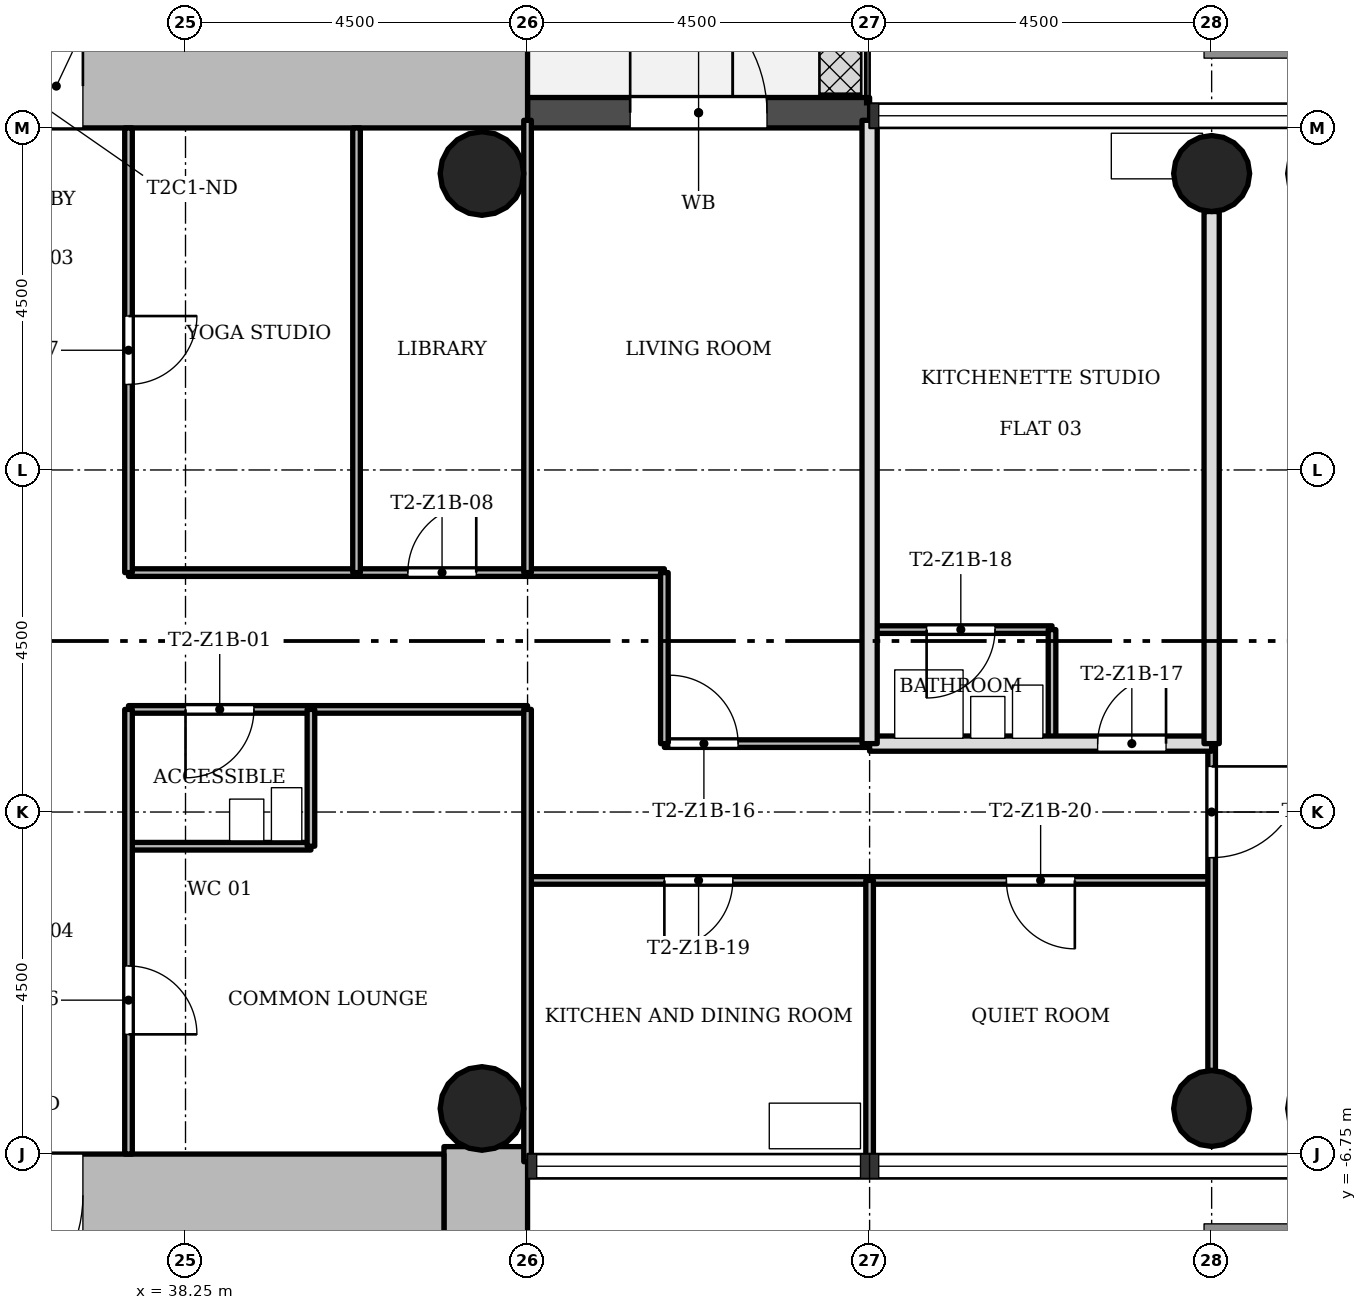
"""IFC4 building model, lengths in metres.
Left out: names, types, materials, properties, quantities, classifications, styles, units other than length and angle.
Written with IfcOpenShell. Run it as: python <this file> out.ifc"""

import sys

from ifc_helpers import new_model, si_unit, direction, frame, frame_2d, origin, origin_2d, place, context, subcontext, project, spatial, rectangle, hollow_circle, extrude, element, fill, save


model = new_model("IFC4")
c1 = context("Model", 3, precision=1e-05, world=origin(), true_north=direction((0.0, 1.0)))
c2 = subcontext(c1, "Body", "Model", "MODEL_VIEW")
j1 = project(units=[si_unit("LENGTHUNIT", "METRE"), si_unit("PLANEANGLEUNIT", "RADIAN")], contexts=[c1])
p1 = place(None, origin())
s1 = spatial("IfcSite", under=j1, at=p1, CompositionType="ELEMENT")
p2 = place(p1, origin())
s2 = spatial("IfcBuilding", under=s1, at=p2, CompositionType="ELEMENT")
p3 = place(p2, frame((0.0, 0.0, 38.1)))
s3 = spatial("IfcBuildingStorey", under=s2, at=p3, CompositionType="ELEMENT", Elevation=38.1)
p4 = place(p3, frame((30.35, 7.3, 0.0), z_axis=(0.0, 0.0, 1.0), x_axis=(1.0, 0.0, 0.0)))
e1 = element("IfcWall", 1, at=p4, inside=s3, PredefinedType="SHEAR", context=c2, shape_type="SweptSolid", body=[
    extrude(rectangle(XDim=12.4, YDim=1.1, at=frame_2d((6.2, 0.0))), origin(), (0.0, 0.0, 1.0), 3.4),
])
p5 = place(p4, frame((4.75, 0.0, 0.0)))
e2 = element("IfcOpeningElement", 2, at=p5, cuts=e1, PredefinedType="OPENING", context=c2, shape_type="SweptSolid", body=[
    extrude(rectangle(XDim=1.8, YDim=2.1, at=frame_2d((0.9, 1.05))), frame((0.0, 0.56, 0.0), z_axis=(0.0, -1.0, 0.0), x_axis=(1.0, 0.0, 0.0)), (0.0, 0.0, 1.0), 1.12),
])
p6 = place(p3, frame((42.2, -15.248, 0.0), z_axis=(0.0, 0.0, 1.0), x_axis=(0.0, 1.0, 0.0)))
e3 = element("IfcWall", 3, at=p6, inside=s3, PredefinedType="SHEAR", context=c2, shape_type="SweptSolid", body=[
    extrude(rectangle(XDim=8.596, YDim=1.1, at=frame_2d((4.298, 0.0))), origin(), (0.0, 0.0, 1.0), 3.4),
])
p7 = place(p3, frame((41.65, -7.3, 0.0), z_axis=(0.0, 0.0, 1.0), x_axis=(-1.0, 0.0, 0.0)))
e4 = element("IfcWall", 4, at=p7, inside=s3, PredefinedType="SHEAR", context=c2, shape_type="SweptSolid", body=[
    extrude(rectangle(XDim=12.4, YDim=1.1, at=frame_2d((6.2, 0.0))), origin(), (0.0, 0.0, 1.0), 3.4),
])
p8 = place(p7, frame((4.75, 0.0, 0.0)))
e5 = element("IfcOpeningElement", 5, at=p8, cuts=e4, PredefinedType="OPENING", context=c2, shape_type="SweptSolid", body=[
    extrude(rectangle(XDim=1.8, YDim=2.1, at=frame_2d((0.9, 1.05))), frame((0.0, 0.56, 0.0), z_axis=(0.0, -1.0, 0.0), x_axis=(1.0, 0.0, 0.0)), (0.0, 0.0, 1.0), 1.12),
])
for number, where, z_axis, x_axis in (
    (6, (51.75, -6.15, 0.0), (0.0, 0.0, 1.0), (1.0, 0.0, 0.0)),
    (7, (51.75, 6.15, 0.0), (0.0, 0.0, 1.0), (1.0, 0.0, 0.0)),
):
    element("IfcColumn", number, at=place(p3, frame(where, z_axis=z_axis, x_axis=x_axis)), inside=s3, PredefinedType="COLUMN", context=c2, shape_type="SweptSolid", body=[
        extrude(hollow_circle(Radius=0.5, WallThickness=0.036, at=origin_2d()), origin(), (0.0, 0.0, 1.0), 3.4),
    ])
for number, where, z_axis, x_axis in (
    (8, (42.15, -6.15, 0.0), (0.0, 0.0, 1.0), (1.0, 0.0, 0.0)),
    (9, (42.15, 6.15, 0.0), (0.0, 0.0, 1.0), (1.0, 0.0, 0.0)),
):
    element("IfcColumn", number, at=place(p3, frame(where, z_axis=z_axis, x_axis=x_axis)), inside=s3, PredefinedType="COLUMN", context=c2, shape_type="SweptSolid", body=[
        extrude(hollow_circle(Radius=0.55, WallThickness=0.04, at=origin_2d()), origin(), (0.0, 0.0, 1.0), 3.4),
    ])
p9 = place(p3, frame((47.25, 6.95, -0.02), z_axis=(0.0, 0.0, 1.0), x_axis=(-1.0, 0.0, 0.0)))
e10 = element("IfcWall", 10, at=p9, inside=s3, PredefinedType="STANDARD", context=c2, shape_type="SweptSolid", body=[
    extrude(rectangle(XDim=4.5, YDim=0.4, at=frame_2d((2.25, 0.0))), origin(), (0.0, 0.0, 1.0), 3.12),
])
p10 = place(p9, frame((1.35, 0.0, 0.02)))
e11 = element("IfcOpeningElement", 11, at=p10, cuts=e10, PredefinedType="OPENING", context=c2, shape_type="SweptSolid", body=[
    extrude(rectangle(XDim=1.8, YDim=2.1, at=frame_2d((0.9, 1.05))), frame((0.0, 0.21, 0.0), z_axis=(0.0, -1.0, 0.0), x_axis=(1.0, 0.0, 0.0)), (0.0, 0.0, 1.0), 0.42),
])
p11 = place(p3, frame((51.75, -3.15, 0.0), z_axis=(0.0, 0.0, 1.0), x_axis=(-1.0, 0.0, 0.0)))
e12 = element("IfcWall", 12, at=p11, inside=s3, PredefinedType="PARTITIONING", context=c2, shape_type="SweptSolid", body=[
    extrude(rectangle(XDim=9.0, YDim=0.1, at=frame_2d((4.5, 0.0))), origin(), (0.0, 0.0, 1.0), 3.0),
])
p12 = place(p11, frame((6.3, 0.0, 0.0)))
e13 = element("IfcOpeningElement", 13, at=p12, cuts=e12, PredefinedType="OPENING", context=c2, shape_type="SweptSolid", body=[
    extrude(rectangle(XDim=0.9, YDim=2.1, at=frame_2d((0.45, 1.05))), frame((0.0, 0.06, 0.0), z_axis=(0.0, -1.0, 0.0), x_axis=(1.0, 0.0, 0.0)), (0.0, 0.0, 1.0), 0.12),
])
p13 = place(p11, frame((1.8, 0.0, 0.0)))
e14 = element("IfcOpeningElement", 14, at=p13, cuts=e12, PredefinedType="OPENING", context=c2, shape_type="SweptSolid", body=[
    extrude(rectangle(XDim=0.9, YDim=2.1, at=frame_2d((0.45, 1.05))), frame((0.0, 0.06, 0.0), z_axis=(0.0, -1.0, 0.0), x_axis=(1.0, 0.0, 0.0)), (0.0, 0.0, 1.0), 0.12),
])
p14 = place(p3, frame((39.9, -2.7, 0.0), z_axis=(0.0, 0.0, 1.0), x_axis=(-1.0, 0.0, 0.0)))
e15 = element("IfcWall", 15, at=p14, inside=s3, PredefinedType="PARTITIONING", context=c2, shape_type="SweptSolid", body=[
    extrude(rectangle(XDim=2.4, YDim=0.1, at=frame_2d((1.2, 0.0))), origin(), (0.0, 0.0, 1.0), 3.0),
])
p15 = place(p3, frame((47.25, -1.35, 0.0), z_axis=(0.0, 0.0, 1.0), x_axis=(-1.0, 0.0, 0.0)))
e16 = element("IfcWall", 16, at=p15, inside=s3, PredefinedType="PARTITIONING", context=c2, shape_type="SweptSolid", body=[
    extrude(rectangle(XDim=2.7, YDim=0.1, at=frame_2d((1.35, 0.0))), origin(), (0.0, 0.0, 1.0), 3.0),
])
p16 = place(p15, frame((1.73, 0.0, 0.0)))
e17 = element("IfcOpeningElement", 17, at=p16, cuts=e16, PredefinedType="OPENING", context=c2, shape_type="SweptSolid", body=[
    extrude(rectangle(XDim=0.9, YDim=2.1, at=frame_2d((0.45, 1.05))), frame((0.0, 0.06, 0.0), z_axis=(0.0, -1.0, 0.0), x_axis=(1.0, 0.0, 0.0)), (0.0, 0.0, 1.0), 0.12),
])
p17 = place(p3, frame((51.75, -1.35, 0.0), z_axis=(0.0, 0.0, 1.0), x_axis=(-1.0, 0.0, 0.0)))
e18 = element("IfcWall", 18, at=p17, inside=s3, PredefinedType="SOLIDWALL", context=c2, shape_type="SweptSolid", body=[
    extrude(rectangle(XDim=4.5, YDim=0.2, at=frame_2d((2.25, 0.0))), origin(), (0.0, 0.0, 1.0), 3.0),
])
p18 = place(p17, frame((0.6, 0.0, 0.0)))
e19 = element("IfcOpeningElement", 19, at=p18, cuts=e18, PredefinedType="OPENING", context=c2, shape_type="SweptSolid", body=[
    extrude(rectangle(XDim=0.9, YDim=2.1, at=frame_2d((0.45, 1.05))), frame((0.0, 0.11, 0.0), z_axis=(0.0, -1.0, 0.0), x_axis=(1.0, 0.0, 0.0)), (0.0, 0.0, 1.0), 0.22),
])
p19 = place(p3, frame((42.75, -0.9, 0.0), z_axis=(0.0, 0.0, 1.0), x_axis=(-1.0, 0.0, 0.0)))
e20 = element("IfcWall", 20, at=p19, inside=s3, PredefinedType="PARTITIONING", context=c2, shape_type="SweptSolid", body=[
    extrude(rectangle(XDim=5.25, YDim=0.1, at=frame_2d((2.625, 0.0))), origin(), (0.0, 0.0, 1.0), 3.0),
])
p20 = place(p19, frame((3.6, 0.0, 0.0)))
e21 = element("IfcOpeningElement", 21, at=p20, cuts=e20, PredefinedType="OPENING", context=c2, shape_type="SweptSolid", body=[
    extrude(rectangle(XDim=0.9, YDim=2.1, at=frame_2d((0.45, 1.05))), frame((0.0, 0.06, 0.0), z_axis=(0.0, -1.0, 0.0), x_axis=(1.0, 0.0, 0.0)), (0.0, 0.0, 1.0), 0.12),
])
p21 = place(p3, frame((49.65, 0.15, 0.0), z_axis=(0.0, 0.0, 1.0), x_axis=(-1.0, 0.0, 0.0)))
e22 = element("IfcWall", 22, at=p21, inside=s3, PredefinedType="PARTITIONING", context=c2, shape_type="SweptSolid", body=[
    extrude(rectangle(XDim=2.4, YDim=0.1, at=frame_2d((1.2, 0.0))), origin(), (0.0, 0.0, 1.0), 3.0),
])
p22 = place(p21, frame((0.75, 0.0, 0.0)))
e23 = element("IfcOpeningElement", 23, at=p22, cuts=e22, PredefinedType="OPENING", context=c2, shape_type="SweptSolid", body=[
    extrude(rectangle(XDim=0.9, YDim=2.1, at=frame_2d((0.45, 1.05))), frame((0.0, 0.06, 0.0), z_axis=(0.0, -1.0, 0.0), x_axis=(1.0, 0.0, 0.0)), (0.0, 0.0, 1.0), 0.12),
])
p23 = place(p3, frame((44.55, 0.9, 0.0), z_axis=(0.0, 0.0, 1.0), x_axis=(-1.0, 0.0, 0.0)))
e24 = element("IfcWall", 24, at=p23, inside=s3, PredefinedType="PARTITIONING", context=c2, shape_type="SweptSolid", body=[
    extrude(rectangle(XDim=7.05, YDim=0.1, at=frame_2d((3.525, 0.0))), origin(), (0.0, 0.0, 1.0), 3.0),
])
p24 = place(p23, frame((2.475, 0.0, 0.0)))
e25 = element("IfcOpeningElement", 25, at=p24, cuts=e24, PredefinedType="OPENING", context=c2, shape_type="SweptSolid", body=[
    extrude(rectangle(XDim=0.9, YDim=2.1, at=frame_2d((0.45, 1.05))), frame((0.0, 0.06, 0.0), z_axis=(0.0, -1.0, 0.0), x_axis=(1.0, 0.0, 0.0)), (0.0, 0.0, 1.0), 0.12),
])
p25 = place(p3, frame((51.75, -5.65, 0.0), z_axis=(0.0, 0.0, 1.0), x_axis=(0.0, 1.0, 0.0)))
e26 = element("IfcWall", 26, at=p25, inside=s3, PredefinedType="PARTITIONING", context=c2, shape_type="SweptSolid", body=[
    extrude(rectangle(XDim=4.3, YDim=0.1, at=frame_2d((2.15, 0.0))), origin(), (0.0, 0.0, 1.0), 3.0),
])
p26 = place(p25, frame((2.8, 0.0, 0.0)))
e27 = element("IfcOpeningElement", 27, at=p26, cuts=e26, PredefinedType="OPENING", context=c2, shape_type="SweptSolid", body=[
    extrude(rectangle(XDim=1.2, YDim=2.1, at=frame_2d((0.6, 1.05))), frame((0.0, 0.06, 0.0), z_axis=(0.0, -1.0, 0.0), x_axis=(1.0, 0.0, 0.0)), (0.0, 0.0, 1.0), 0.12),
])
p27 = place(p3, frame((51.75, -1.35, 0.0), z_axis=(0.0, 0.0, 1.0), x_axis=(0.0, 1.0, 0.0)))
e28 = element("IfcWall", 28, at=p27, inside=s3, PredefinedType="SOLIDWALL", context=c2, shape_type="SweptSolid", body=[
    extrude(rectangle(XDim=7.0, YDim=0.2, at=frame_2d((3.5, 0.0))), origin(), (0.0, 0.0, 1.0), 3.0),
])
p28 = place(p3, frame((49.65, -1.35, 0.0), z_axis=(0.0, 0.0, 1.0), x_axis=(0.0, 1.0, 0.0)))
e29 = element("IfcWall", 29, at=p28, inside=s3, PredefinedType="PARTITIONING", context=c2, shape_type="SweptSolid", body=[
    extrude(rectangle(XDim=1.5, YDim=0.1, at=frame_2d((0.75, 0.0))), origin(), (0.0, 0.0, 1.0), 3.0),
])
p29 = place(p3, frame((47.25, -6.85, 0.0), z_axis=(0.0, 0.0, 1.0), x_axis=(0.0, 1.0, 0.0)))
e30 = element("IfcWall", 30, at=p29, inside=s3, PredefinedType="PARTITIONING", context=c2, shape_type="SweptSolid", body=[
    extrude(rectangle(XDim=3.7, YDim=0.1, at=frame_2d((1.85, 0.0))), origin(), (0.0, 0.0, 1.0), 3.0),
])
p30 = place(p3, frame((47.25, -1.35, 0.0), z_axis=(0.0, 0.0, 1.0), x_axis=(0.0, 1.0, 0.0)))
e31 = element("IfcWall", 31, at=p30, inside=s3, PredefinedType="SOLIDWALL", context=c2, shape_type="SweptSolid", body=[
    extrude(rectangle(XDim=8.2, YDim=0.2, at=frame_2d((4.1, 0.0))), origin(), (0.0, 0.0, 1.0), 3.0),
])
p31 = place(p3, frame((44.55, -1.35, 0.0), z_axis=(0.0, 0.0, 1.0), x_axis=(0.0, 1.0, 0.0)))
e32 = element("IfcWall", 32, at=p31, inside=s3, PredefinedType="PARTITIONING", context=c2, shape_type="SweptSolid", body=[
    extrude(rectangle(XDim=2.25, YDim=0.1, at=frame_2d((1.125, 0.0))), origin(), (0.0, 0.0, 1.0), 3.0),
])
for number, where, z_axis, x_axis in (
    (33, (42.75, -6.85, 0.0), (0.0, 0.0, 1.0), (0.0, 1.0, 0.0)),
    (34, (42.75, 0.9, 0.0), (0.0, 0.0, 1.0), (0.0, 1.0, 0.0)),
):
    element("IfcWall", number, at=place(p3, frame(where, z_axis=z_axis, x_axis=x_axis)), inside=s3, PredefinedType="PARTITIONING", context=c2, shape_type="SweptSolid", body=[
        extrude(rectangle(XDim=5.95, YDim=0.1, at=frame_2d((2.975, 0.0))), origin(), (0.0, 0.0, 1.0), 3.0),
    ])
p32 = place(p3, frame((40.5, 0.9, 0.0), z_axis=(0.0, 0.0, 1.0), x_axis=(0.0, 1.0, 0.0)))
e35 = element("IfcWall", 35, at=p32, inside=s3, PredefinedType="PARTITIONING", context=c2, shape_type="SweptSolid", body=[
    extrude(rectangle(XDim=5.85, YDim=0.1, at=frame_2d((2.925, 0.0))), origin(), (0.0, 0.0, 1.0), 3.0),
])
p33 = place(p3, frame((39.9, -2.7, 0.0), z_axis=(0.0, 0.0, 1.0), x_axis=(0.0, 1.0, 0.0)))
e36 = element("IfcWall", 36, at=p33, inside=s3, PredefinedType="PARTITIONING", context=c2, shape_type="SweptSolid", body=[
    extrude(rectangle(XDim=1.8, YDim=0.1, at=frame_2d((0.9, 0.0))), origin(), (0.0, 0.0, 1.0), 3.0),
])
p34 = place(p3, frame((37.5, -6.75, 0.0), z_axis=(0.0, 0.0, 1.0), x_axis=(0.0, 1.0, 0.0)))
e37 = element("IfcWall", 37, at=p34, inside=s3, PredefinedType="PARTITIONING", context=c2, shape_type="SweptSolid", body=[
    extrude(rectangle(XDim=5.85, YDim=0.1, at=frame_2d((2.925, 0.0))), origin(), (0.0, 0.0, 1.0), 3.0),
])
p35 = place(p34, frame((1.575, 0.0, 0.0)))
e38 = element("IfcOpeningElement", 38, at=p35, cuts=e37, PredefinedType="OPENING", context=c2, shape_type="SweptSolid", body=[
    extrude(rectangle(XDim=0.9, YDim=2.1, at=frame_2d((0.45, 1.05))), frame((0.0, 0.06, 0.0), z_axis=(0.0, -1.0, 0.0), x_axis=(1.0, 0.0, 0.0)), (0.0, 0.0, 1.0), 0.12),
])
p36 = place(p3, frame((37.5, 0.9, 0.0), z_axis=(0.0, 0.0, 1.0), x_axis=(0.0, 1.0, 0.0)))
e39 = element("IfcWall", 39, at=p36, inside=s3, PredefinedType="PARTITIONING", context=c2, shape_type="SweptSolid", body=[
    extrude(rectangle(XDim=5.85, YDim=0.1, at=frame_2d((2.925, 0.0))), origin(), (0.0, 0.0, 1.0), 3.0),
])
p37 = place(p36, frame((2.475, 0.0, 0.0)))
e40 = element("IfcOpeningElement", 40, at=p37, cuts=e39, PredefinedType="OPENING", context=c2, shape_type="SweptSolid", body=[
    extrude(rectangle(XDim=0.9, YDim=2.1, at=frame_2d((0.45, 1.05))), frame((0.0, 0.06, 0.0), z_axis=(0.0, -1.0, 0.0), x_axis=(1.0, 0.0, 0.0)), (0.0, 0.0, 1.0), 0.12),
])
p38 = place(p10, origin())
e41 = element("IfcDoor", 41, at=p38, inside=s3, OperationType="SINGLE_SWING_RIGHT", PredefinedType="DOOR", context=c2, shape_type="SweptSolid", body=[
    extrude(rectangle(XDim=1.8, YDim=2.1, at=frame_2d((0.9, 1.05))), frame((0.0, 0.025, 0.0), z_axis=(0.0, -1.0, 0.0), x_axis=(1.0, 0.0, 0.0)), (0.0, 0.0, 1.0), 0.05),
])
fill(e11, e41)
p39 = place(p20, origin())
e42 = element("IfcDoor", 42, at=p39, inside=s3, OperationType="SINGLE_SWING_LEFT", PredefinedType="DOOR", context=c2, shape_type="SweptSolid", body=[
    extrude(rectangle(XDim=0.9, YDim=2.1, at=frame_2d((0.45, 1.05))), frame((0.0, 0.025, 0.0), z_axis=(0.0, -1.0, 0.0), x_axis=(1.0, 0.0, 0.0)), (0.0, 0.0, 1.0), 0.05),
])
fill(e21, e42)
p40 = place(p35, origin())
e43 = element("IfcDoor", 43, at=p40, inside=s3, OperationType="SINGLE_SWING_LEFT", PredefinedType="DOOR", context=c2, shape_type="SweptSolid", body=[
    extrude(rectangle(XDim=0.9, YDim=2.1, at=frame_2d((0.45, 1.05))), frame((0.0, 0.025, 0.0), z_axis=(0.0, -1.0, 0.0), x_axis=(1.0, 0.0, 0.0)), (0.0, 0.0, 1.0), 0.05),
])
fill(e38, e43)
p41 = place(p37, origin())
e44 = element("IfcDoor", 44, at=p41, inside=s3, OperationType="SINGLE_SWING_RIGHT", PredefinedType="DOOR", context=c2, shape_type="SweptSolid", body=[
    extrude(rectangle(XDim=0.9, YDim=2.1, at=frame_2d((0.45, 1.05))), frame((0.0, 0.025, 0.0), z_axis=(0.0, -1.0, 0.0), x_axis=(1.0, 0.0, 0.0)), (0.0, 0.0, 1.0), 0.05),
])
fill(e40, e44)
p42 = place(p24, origin())
e45 = element("IfcDoor", 45, at=p42, inside=s3, OperationType="SINGLE_SWING_LEFT", PredefinedType="DOOR", context=c2, shape_type="SweptSolid", body=[
    extrude(rectangle(XDim=0.9, YDim=2.1, at=frame_2d((0.45, 1.05))), frame((0.0, 0.025, 0.0), z_axis=(0.0, -1.0, 0.0), x_axis=(1.0, 0.0, 0.0)), (0.0, 0.0, 1.0), 0.05),
])
fill(e25, e45)
p43 = place(p16, origin())
e46 = element("IfcDoor", 46, at=p43, inside=s3, OperationType="SINGLE_SWING_RIGHT", PredefinedType="DOOR", context=c2, shape_type="SweptSolid", body=[
    extrude(rectangle(XDim=0.9, YDim=2.1, at=frame_2d((0.45, 1.05))), frame((0.0, 0.025, 0.0), z_axis=(0.0, -1.0, 0.0), x_axis=(1.0, 0.0, 0.0)), (0.0, 0.0, 1.0), 0.05),
])
fill(e17, e46)
p44 = place(p18, origin())
e47 = element("IfcDoor", 47, at=p44, inside=s3, OperationType="SINGLE_SWING_LEFT", PredefinedType="DOOR", context=c2, shape_type="SweptSolid", body=[
    extrude(rectangle(XDim=0.9, YDim=2.1, at=frame_2d((0.45, 1.05))), frame((0.0, 0.025, 0.0), z_axis=(0.0, -1.0, 0.0), x_axis=(1.0, 0.0, 0.0)), (0.0, 0.0, 1.0), 0.05),
])
fill(e19, e47)
p45 = place(p22, origin())
e48 = element("IfcDoor", 48, at=p45, inside=s3, OperationType="SINGLE_SWING_LEFT", PredefinedType="DOOR", context=c2, shape_type="SweptSolid", body=[
    extrude(rectangle(XDim=0.9, YDim=2.1, at=frame_2d((0.45, 1.05))), frame((0.0, 0.025, 0.0), z_axis=(0.0, -1.0, 0.0), x_axis=(1.0, 0.0, 0.0)), (0.0, 0.0, 1.0), 0.05),
])
fill(e23, e48)
p46 = place(p12, origin())
e49 = element("IfcDoor", 49, at=p46, inside=s3, OperationType="SINGLE_SWING_LEFT", PredefinedType="DOOR", context=c2, shape_type="SweptSolid", body=[
    extrude(rectangle(XDim=0.9, YDim=2.1, at=frame_2d((0.45, 1.05))), frame((0.0, 0.025, 0.0), z_axis=(0.0, -1.0, 0.0), x_axis=(1.0, 0.0, 0.0)), (0.0, 0.0, 1.0), 0.05),
])
fill(e13, e49)
p47 = place(p13, origin())
e50 = element("IfcDoor", 50, at=p47, inside=s3, OperationType="SINGLE_SWING_RIGHT", PredefinedType="DOOR", context=c2, shape_type="SweptSolid", body=[
    extrude(rectangle(XDim=0.9, YDim=2.1, at=frame_2d((0.45, 1.05))), frame((0.0, 0.025, 0.0), z_axis=(0.0, -1.0, 0.0), x_axis=(1.0, 0.0, 0.0)), (0.0, 0.0, 1.0), 0.05),
])
fill(e14, e50)
p48 = place(p26, origin())
e51 = element("IfcDoor", 51, at=p48, inside=s3, OperationType="SINGLE_SWING_RIGHT", PredefinedType="DOOR", context=c2, shape_type="SweptSolid", body=[
    extrude(rectangle(XDim=1.2, YDim=2.1, at=frame_2d((0.6, 1.05))), frame((0.0, 0.025, 0.0), z_axis=(0.0, -1.0, 0.0), x_axis=(1.0, 0.0, 0.0)), (0.0, 0.0, 1.0), 0.05),
])
fill(e27, e51)
p49 = place(p5, origin())
e52 = element("IfcDoor", 52, at=p49, inside=s3, OperationType="SINGLE_SWING_LEFT", PredefinedType="DOOR", context=c2, shape_type="SweptSolid", body=[
    extrude(rectangle(XDim=1.8, YDim=2.1, at=frame_2d((0.9, 1.05))), frame((0.0, 0.025, 0.0), z_axis=(0.0, -1.0, 0.0), x_axis=(1.0, 0.0, 0.0)), (0.0, 0.0, 1.0), 0.05),
])
fill(e2, e52)
p50 = place(p8, origin())
e53 = element("IfcDoor", 53, at=p50, inside=s3, OperationType="SINGLE_SWING_LEFT", PredefinedType="DOOR", context=c2, shape_type="SweptSolid", body=[
    extrude(rectangle(XDim=1.8, YDim=2.1, at=frame_2d((0.9, 1.05))), frame((0.0, 0.025, 0.0), z_axis=(0.0, -1.0, 0.0), x_axis=(1.0, 0.0, 0.0)), (0.0, 0.0, 1.0), 0.05),
])
fill(e5, e53)
save(model, sys.argv[1])
